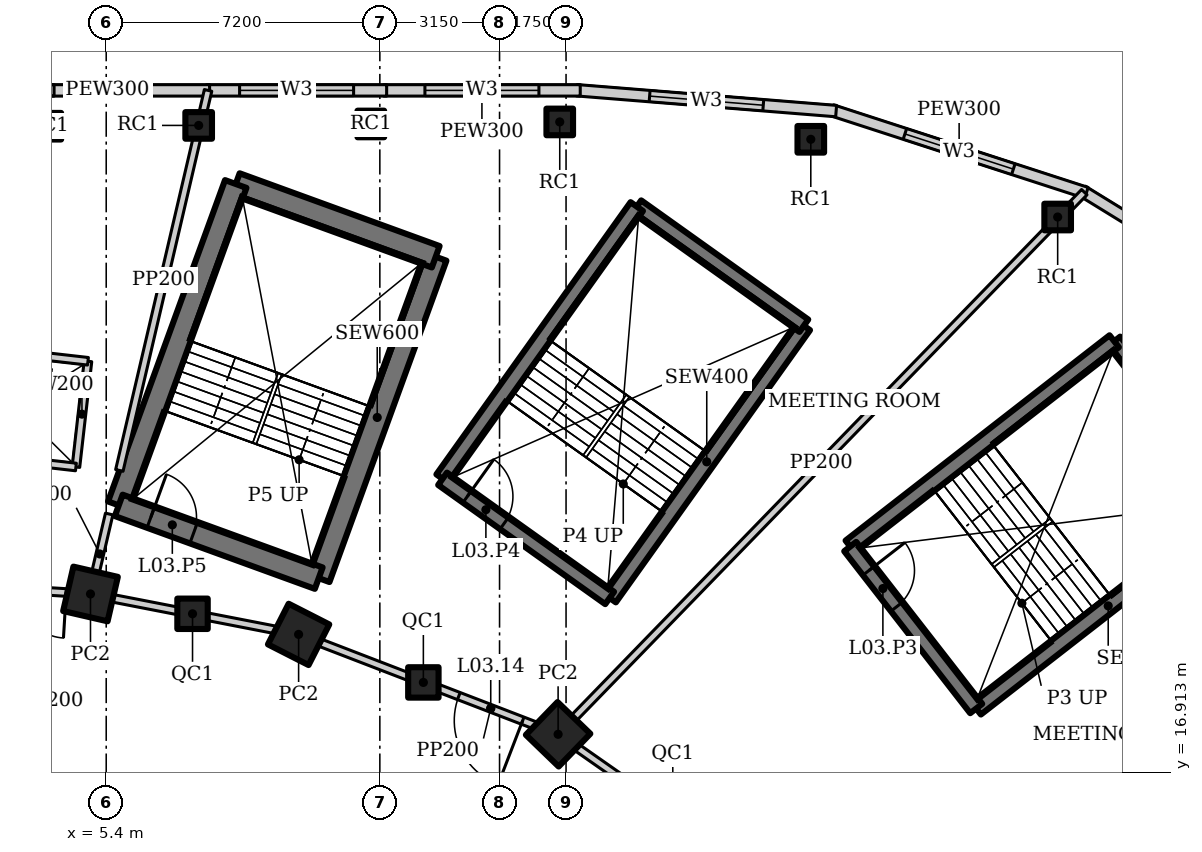
"""IFC4 building model, lengths in metres.
Left out: names, types, materials, properties, quantities, classifications, styles, units other than length and angle.
Written with IfcOpenShell. Run it as: python <this file> out.ifc"""

import sys

from ifc_helpers import new_model, si_unit, direction, frame, frame_2d, origin, origin_2d, place, context, subcontext, project, spatial, rectangle, hollow_rectangle, extrude, element, fill, save


model = new_model("IFC4")
c1 = context("Model", 3, precision=1e-05, world=origin(), true_north=direction((0.0, 1.0)))
c2 = subcontext(c1, "Body", "Model", "MODEL_VIEW")
j1 = project(units=[si_unit("LENGTHUNIT", "METRE"), si_unit("PLANEANGLEUNIT", "RADIAN")], contexts=[c1])
p1 = place(None, origin())
s1 = spatial("IfcSite", under=j1, at=p1, CompositionType="ELEMENT")
p2 = place(p1, origin())
s2 = spatial("IfcBuilding", under=s1, at=p2, CompositionType="ELEMENT")
p3 = place(p2, frame((0.0, 0.0, 22.0)))
s3 = spatial("IfcBuildingStorey", under=s2, at=p3, CompositionType="ELEMENT", Elevation=22.0)
for number, where, z_axis, x_axis in (
    (1, (17.291, 17.905, 0.0), (0.0, 0.0, 1.0), (0.695, 0.719, 0.0)),
    (2, (10.463, 20.534, 0.0), (0.0, 0.0, 1.0), (0.454, 0.891, 0.0)),
    (3, (4.986, 21.598, 0.0), (0.0, 0.0, 1.0), (0.225, 0.974, 0.0)),
):
    element("IfcColumn", number, at=place(p3, frame(where, z_axis=z_axis, x_axis=x_axis)), inside=s3, PredefinedType="COLUMN", context=c2, shape_type="SweptSolid", body=[
        extrude(hollow_rectangle(XDim=1.2, YDim=1.2, WallThickness=0.1, at=origin_2d()), origin(), (0.0, 0.0, 1.0), 5.0),
    ])
for number, where, z_axis, x_axis in (
    (4, (13.745, 19.27, 0.0), (0.0, 0.0, 1.0), (1.0, 0.0, 0.0)),
    (5, (7.671, 21.076, 0.0), (0.0, 0.0, 1.0), (1.0, 0.0, 0.0)),
):
    element("IfcColumn", number, at=place(p3, frame(where, z_axis=z_axis, x_axis=x_axis)), inside=s3, PredefinedType="COLUMN", context=c2, shape_type="SweptSolid", body=[
        extrude(hollow_rectangle(XDim=0.8, YDim=0.8, WallThickness=0.05, at=origin_2d()), origin(), (0.0, 0.0, 1.0), 5.0),
    ])
for number, where, z_axis, x_axis in (
    (6, (23.94, 33.563, 0.0), (0.0, 0.0, 1.0), (1.0, 0.0, 0.0)),
    (7, (12.363, 33.966, 0.0), (0.0, 0.0, 1.0), (1.0, 0.0, 0.0)),
    (8, (3.863, 33.907, 0.0), (0.0, 0.0, 1.0), (1.0, 0.0, 0.0)),
    (9, (30.436, 31.518, 0.0), (0.0, 0.0, 1.0), (1.0, 0.0, 0.0)),
    (10, (17.334, 34.02, 0.0), (0.0, 0.0, 1.0), (1.0, 0.0, 0.0)),
    (11, (7.833, 33.928, 0.0), (0.0, 0.0, 1.0), (1.0, 0.0, 0.0)),
):
    element("IfcColumn", number, at=place(p3, frame(where, z_axis=z_axis, x_axis=x_axis)), inside=s3, PredefinedType="COLUMN", context=c2, shape_type="SweptSolid", body=[
        extrude(hollow_rectangle(XDim=0.7, YDim=0.7, WallThickness=0.04, at=origin_2d()), origin(), (0.0, 0.0, 1.0), 5.0),
    ])
p4 = place(p3, frame((36.932, 28.608, 0.0), z_axis=(0.0, 0.0, 1.0), x_axis=(-0.851808565246, 0.52385319334, 0.0)))
e12 = element("IfcWall", 12, at=p4, inside=s3, PredefinedType="SOLIDWALL", context=c2, shape_type="SweptSolid", body=[
    extrude(rectangle(XDim=6.861, YDim=0.3, at=frame_2d((3.43, 0.0))), origin(), (0.0, 0.0, 1.0), 4.8),
])
p5 = place(p4, frame((1.93, 0.0, 0.9)))
e13 = element("IfcOpeningElement", 13, at=p5, cuts=e12, PredefinedType="OPENING", context=c2, shape_type="SweptSolid", body=[
    extrude(rectangle(XDim=3.0, YDim=2.0, at=frame_2d((1.5, 1.0))), frame((0.0, 0.16, 0.0), z_axis=(0.0, -1.0, 0.0), x_axis=(1.0, 0.0, 0.0)), (0.0, 0.0, 1.0), 0.32),
])
p6 = place(p3, frame((31.192, 32.154, 0.0), z_axis=(0.0, 0.0, 1.0), x_axis=(-0.951140010357, 0.308759907853, 0.0)))
e14 = element("IfcWall", 14, at=p6, inside=s3, PredefinedType="SOLIDWALL", context=c2, shape_type="SweptSolid", body=[
    extrude(rectangle(XDim=7.041, YDim=0.3, at=frame_2d((3.521, 0.0))), origin(), (0.0, 0.0, 1.0), 4.8),
])
p7 = place(p6, frame((2.021, 0.0, 0.9)))
e15 = element("IfcOpeningElement", 15, at=p7, cuts=e14, PredefinedType="OPENING", context=c2, shape_type="SweptSolid", body=[
    extrude(rectangle(XDim=3.0, YDim=2.0, at=frame_2d((1.5, 1.0))), frame((0.0, 0.16, 0.0), z_axis=(0.0, -1.0, 0.0), x_axis=(1.0, 0.0, 0.0)), (0.0, 0.0, 1.0), 0.32),
])
p8 = place(p3, frame((24.607, 34.306, 0.0), z_axis=(0.0, 0.0, 1.0), x_axis=(-0.996791084449, 0.080047073422, 0.0)))
e16 = element("IfcWall", 16, at=p8, inside=s3, PredefinedType="SOLIDWALL", context=c2, shape_type="SweptSolid", body=[
    extrude(rectangle(XDim=6.847, YDim=0.3, at=frame_2d((3.424, 0.0))), origin(), (0.0, 0.0, 1.0), 4.8),
])
p9 = place(p8, frame((1.924, 0.0, 0.9)))
e17 = element("IfcOpeningElement", 17, at=p9, cuts=e16, PredefinedType="OPENING", context=c2, shape_type="SweptSolid", body=[
    extrude(rectangle(XDim=3.0, YDim=2.0, at=frame_2d((1.5, 1.0))), frame((0.0, 0.16, 0.0), z_axis=(0.0, -1.0, 0.0), x_axis=(1.0, 0.0, 0.0)), (0.0, 0.0, 1.0), 0.32),
])
p10 = place(p3, frame((17.873, 34.85, 0.0), z_axis=(0.0, 0.0, 1.0), x_axis=(-1.0, 0.0, 0.0)))
e18 = element("IfcWall", 18, at=p10, inside=s3, PredefinedType="SOLIDWALL", context=c2, shape_type="SweptSolid", body=[
    extrude(rectangle(XDim=5.174, YDim=0.3, at=frame_2d((2.587, 0.0))), origin(), (0.0, 0.0, 1.0), 4.8),
])
p11 = place(p10, frame((1.087, 0.0, 0.9)))
e19 = element("IfcOpeningElement", 19, at=p11, cuts=e18, PredefinedType="OPENING", context=c2, shape_type="SweptSolid", body=[
    extrude(rectangle(XDim=3.0, YDim=2.0, at=frame_2d((1.5, 1.0))), frame((0.0, 0.16, 0.0), z_axis=(0.0, -1.0, 0.0), x_axis=(1.0, 0.0, 0.0)), (0.0, 0.0, 1.0), 0.32),
])
p12 = place(p3, frame((12.779, 34.85, 0.0), z_axis=(0.0, 0.0, 1.0), x_axis=(-1.0, 0.0, 0.0)))
e20 = element("IfcWall", 20, at=p12, inside=s3, PredefinedType="SOLIDWALL", context=c2, shape_type="SweptSolid", body=[
    extrude(rectangle(XDim=4.739, YDim=0.3, at=frame_2d((2.369, 0.0))), origin(), (0.0, 0.0, 1.0), 4.8),
])
p13 = place(p12, frame((0.869, 0.0, 0.9)))
e21 = element("IfcOpeningElement", 21, at=p13, cuts=e20, PredefinedType="OPENING", context=c2, shape_type="SweptSolid", body=[
    extrude(rectangle(XDim=3.0, YDim=2.0, at=frame_2d((1.5, 1.0))), frame((0.0, 0.16, 0.0), z_axis=(0.0, -1.0, 0.0), x_axis=(1.0, 0.0, 0.0)), (0.0, 0.0, 1.0), 0.32),
])
p14 = place(p3, frame((8.12, 34.85, 0.0), z_axis=(0.0, 0.0, 1.0), x_axis=(-1.0, 0.0, 0.0)))
e22 = element("IfcWall", 22, at=p14, inside=s3, PredefinedType="SOLIDWALL", context=c2, shape_type="SweptSolid", body=[
    extrude(rectangle(XDim=4.173, YDim=0.3, at=frame_2d((2.086, 0.0))), origin(), (0.0, 0.0, 1.0), 4.8),
])
p15 = place(p3, frame((4.028, 34.85, 0.0), z_axis=(0.0, 0.0, 1.0), x_axis=(-1.0, 0.0, 0.0)))
e23 = element("IfcWall", 23, at=p15, inside=s3, PredefinedType="SOLIDWALL", context=c2, shape_type="SweptSolid", body=[
    extrude(rectangle(XDim=4.068, YDim=0.3, at=frame_2d((2.034, 0.0))), origin(), (0.0, 0.0, 1.0), 4.8),
])
p16 = place(p3, frame((20.309, 15.794, 0.0), z_axis=(0.0, 0.0, 1.0), x_axis=(-0.819409395821, 0.573208724672, 0.0)))
e24 = element("IfcWall", 24, at=p16, inside=s3, PredefinedType="SOLIDWALL", context=c2, shape_type="SweptSolid", body=[
    extrude(rectangle(XDim=3.683, YDim=0.2, at=frame_2d((1.841, 0.0))), origin(), (0.0, 0.0, 1.0), 4.396),
])
p17 = place(p3, frame((17.291, 17.905, 0.0), z_axis=(0.0, 0.0, 1.0), x_axis=(-0.933224646415, 0.359293416754, 0.0)))
e25 = element("IfcWall", 25, at=p17, inside=s3, PredefinedType="SOLIDWALL", context=c2, shape_type="SweptSolid", body=[
    extrude(rectangle(XDim=3.799, YDim=0.2, at=frame_2d((1.899, 0.0))), origin(), (0.0, 0.0, 1.0), 4.355),
])
p18 = place(p17, frame((1.0, 0.0, 0.0)))
e26 = element("IfcOpeningElement", 26, at=p18, cuts=e25, PredefinedType="OPENING", context=c2, shape_type="SweptSolid", body=[
    extrude(rectangle(XDim=1.8, YDim=2.4, at=frame_2d((0.9, 1.2))), frame((0.0, 0.11, 0.0), z_axis=(0.0, -1.0, 0.0), x_axis=(1.0, 0.0, 0.0)), (0.0, 0.0, 1.0), 0.22),
])
p19 = place(p3, frame((13.745, 19.27, 0.0), z_axis=(0.0, 0.0, 1.0), x_axis=(-0.933241815012, 0.359248820058, 0.0)))
e27 = element("IfcWall", 27, at=p19, inside=s3, PredefinedType="SOLIDWALL", context=c2, shape_type="SweptSolid", body=[
    extrude(rectangle(XDim=3.518, YDim=0.2, at=frame_2d((1.759, 0.0))), origin(), (0.0, 0.0, 1.0), 4.396),
])
p20 = place(p3, frame((10.463, 20.534, 0.0), z_axis=(0.0, 0.0, 1.0), x_axis=(-0.98163593748, 0.190763954266, 0.0)))
e28 = element("IfcWall", 28, at=p20, inside=s3, PredefinedType="SOLIDWALL", context=c2, shape_type="SweptSolid", body=[
    extrude(rectangle(XDim=2.844, YDim=0.2, at=frame_2d((1.422, 0.0))), origin(), (0.0, 0.0, 1.0), 4.338),
])
p21 = place(p3, frame((7.671, 21.076, 0.0), z_axis=(0.0, 0.0, 1.0), x_axis=(-0.981637218105, 0.190757364289, 0.0)))
e29 = element("IfcWall", 29, at=p21, inside=s3, PredefinedType="SOLIDWALL", context=c2, shape_type="SweptSolid", body=[
    extrude(rectangle(XDim=2.735, YDim=0.2, at=frame_2d((1.368, 0.0))), origin(), (0.0, 0.0, 1.0), 4.338),
])
p22 = place(p3, frame((4.986, 21.598, 0.0), z_axis=(0.0, 0.0, 1.0), x_axis=(-0.998172405641, 0.060430527186, 0.0)))
e30 = element("IfcWall", 30, at=p22, inside=s3, PredefinedType="SOLIDWALL", context=c2, shape_type="SweptSolid", body=[
    extrude(rectangle(XDim=2.513, YDim=0.2, at=frame_2d((1.256, 0.0))), origin(), (0.0, 0.0, 1.0), 4.396),
])
p23 = place(p22, frame((0.64, 0.0, 0.0)))
e31 = element("IfcOpeningElement", 31, at=p23, cuts=e30, PredefinedType="OPENING", context=c2, shape_type="SweptSolid", body=[
    extrude(rectangle(XDim=1.2, YDim=2.4, at=frame_2d((0.6, 1.2))), frame((0.0, 0.11, 0.0), z_axis=(0.0, -1.0, 0.0), x_axis=(1.0, 0.0, 0.0)), (0.0, 0.0, 1.0), 0.22),
])
p24 = place(p3, frame((17.291, 17.905, 0.0), z_axis=(0.0, 0.0, 1.0), x_axis=(0.696460684513, 0.717594951855, 0.0)))
e32 = element("IfcWall", 32, at=p24, inside=s3, PredefinedType="SOLIDWALL", context=c2, shape_type="SweptSolid", body=[
    extrude(rectangle(XDim=19.881, YDim=0.2, at=frame_2d((9.94, 0.0))), origin(), (0.0, 0.0, 1.0), 3.3),
])
p25 = place(p3, frame((4.986, 21.598, 0.0), z_axis=(0.0, 0.0, 1.0), x_axis=(0.227351065365, 0.973812863479, 0.0)))
e33 = element("IfcWall", 33, at=p25, inside=s3, PredefinedType="SOLIDWALL", context=c2, shape_type="SweptSolid", body=[
    extrude(rectangle(XDim=2.161, YDim=0.2, at=frame_2d((1.08, 0.0))), origin(), (0.0, 0.0, 1.0), 3.3),
])
p26 = place(p3, frame((5.745, 24.849, 0.0), z_axis=(0.0, 0.0, 1.0), x_axis=(0.227353607936, 0.973812269875, 0.0)))
e34 = element("IfcWall", 34, at=p26, inside=s3, PredefinedType="SOLIDWALL", context=c2, shape_type="SweptSolid", body=[
    extrude(rectangle(XDim=10.27, YDim=0.2, at=frame_2d((5.135, 0.0))), origin(), (0.0, 0.0, 1.0), 3.3),
])
p27 = place(p3, frame((28.293, 18.583, 0.0), z_axis=(0.0, 0.0, 1.0), x_axis=(0.78938060008, 0.613904119726, 0.0)))
e35 = element("IfcWall", 35, at=p27, inside=s3, PredefinedType="SHEAR", context=c2, shape_type="SweptSolid", body=[
    extrude(rectangle(XDim=8.8, YDim=0.4, at=frame_2d((4.4, 0.0))), origin(), (0.0, 0.0, 1.0), 5.0),
])
p28 = place(p3, frame((35.239, 23.985, 0.0), z_axis=(0.0, 0.0, 1.0), x_axis=(-0.613912443548, 0.789374126544, 0.0)))
e36 = element("IfcWall", 36, at=p28, inside=s3, PredefinedType="SHEAR", context=c2, shape_type="SweptSolid", body=[
    extrude(rectangle(XDim=5.4, YDim=0.4, at=frame_2d((2.7, 0.0))), origin(), (0.0, 0.0, 1.0), 5.0),
])
p29 = place(p3, frame((31.924, 28.248, 0.0), z_axis=(0.0, 0.0, 1.0), x_axis=(-0.78938060008, -0.613904119726, 0.0)))
e37 = element("IfcWall", 37, at=p29, inside=s3, PredefinedType="SHEAR", context=c2, shape_type="SweptSolid", body=[
    extrude(rectangle(XDim=8.8, YDim=0.4, at=frame_2d((4.4, 0.0))), origin(), (0.0, 0.0, 1.0), 5.0),
])
p30 = place(p3, frame((24.978, 22.846, 0.0), z_axis=(0.0, 0.0, 1.0), x_axis=(0.613912443548, -0.789374126544, 0.0)))
e38 = element("IfcWall", 38, at=p30, inside=s3, PredefinedType="SHEAR", context=c2, shape_type="SweptSolid", body=[
    extrude(rectangle(XDim=5.4, YDim=0.4, at=frame_2d((2.7, 0.0))), origin(), (0.0, 0.0, 1.0), 5.0),
])
p31 = place(p30, frame((0.8, 0.0, 0.0)))
e39 = element("IfcOpeningElement", 39, at=p31, cuts=e38, PredefinedType="OPENING", context=c2, shape_type="SweptSolid", body=[
    extrude(rectangle(XDim=1.2, YDim=2.1, at=frame_2d((0.6, 1.05))), frame((0.0, 0.21, 0.0), z_axis=(0.0, -1.0, 0.0), x_axis=(1.0, 0.0, 0.0)), (0.0, 0.0, 1.0), 0.42),
])
p32 = place(p3, frame((18.647, 21.493, 0.0), z_axis=(0.0, 0.0, 1.0), x_axis=(0.580705313356, 0.814113836659, 0.0)))
e40 = element("IfcWall", 40, at=p32, inside=s3, PredefinedType="SHEAR", context=c2, shape_type="SweptSolid", body=[
    extrude(rectangle(XDim=8.8, YDim=0.4, at=frame_2d((4.4, 0.0))), origin(), (0.0, 0.0, 1.0), 5.0),
])
p33 = place(p3, frame((23.757, 28.657, 0.0), z_axis=(0.0, 0.0, 1.0), x_axis=(-0.814121252423, 0.580694916762, 0.0)))
e41 = element("IfcWall", 41, at=p33, inside=s3, PredefinedType="SHEAR", context=c2, shape_type="SweptSolid", body=[
    extrude(rectangle(XDim=5.4, YDim=0.4, at=frame_2d((2.7, 0.0))), origin(), (0.0, 0.0, 1.0), 5.0),
])
p34 = place(p3, frame((19.361, 31.793, 0.0), z_axis=(0.0, 0.0, 1.0), x_axis=(-0.580705313356, -0.814113836659, 0.0)))
e42 = element("IfcWall", 42, at=p34, inside=s3, PredefinedType="SHEAR", context=c2, shape_type="SweptSolid", body=[
    extrude(rectangle(XDim=8.8, YDim=0.4, at=frame_2d((4.4, 0.0))), origin(), (0.0, 0.0, 1.0), 5.0),
])
p35 = place(p3, frame((14.251, 24.629, 0.0), z_axis=(0.0, 0.0, 1.0), x_axis=(0.814121252423, -0.580694916762, 0.0)))
e43 = element("IfcWall", 43, at=p35, inside=s3, PredefinedType="SHEAR", context=c2, shape_type="SweptSolid", body=[
    extrude(rectangle(XDim=5.4, YDim=0.4, at=frame_2d((2.7, 0.0))), origin(), (0.0, 0.0, 1.0), 5.0),
])
p36 = place(p35, frame((0.8, 0.0, 0.0)))
e44 = element("IfcOpeningElement", 44, at=p36, cuts=e43, PredefinedType="OPENING", context=c2, shape_type="SweptSolid", body=[
    extrude(rectangle(XDim=1.2, YDim=2.1, at=frame_2d((0.6, 1.05))), frame((0.0, 0.21, 0.0), z_axis=(0.0, -1.0, 0.0), x_axis=(1.0, 0.0, 0.0)), (0.0, 0.0, 1.0), 0.42),
])
p37 = place(p3, frame((10.992, 22.014, 0.0), z_axis=(0.0, 0.0, 1.0), x_axis=(0.342013127703, 0.939695174234, 0.0)))
e45 = element("IfcWall", 45, at=p37, inside=s3, PredefinedType="SHEAR", context=c2, shape_type="SweptSolid", body=[
    extrude(rectangle(XDim=9.0, YDim=0.6, at=frame_2d((4.5, 0.0))), origin(), (0.0, 0.0, 1.0), 5.0),
])
p38 = place(p3, frame((14.07, 30.471, 0.0), z_axis=(0.0, 0.0, 1.0), x_axis=(-0.939692822968, 0.342019587834, 0.0)))
e46 = element("IfcWall", 46, at=p38, inside=s3, PredefinedType="SHEAR", context=c2, shape_type="SweptSolid", body=[
    extrude(rectangle(XDim=5.6, YDim=0.6, at=frame_2d((2.8, 0.0))), origin(), (0.0, 0.0, 1.0), 5.0),
])
p39 = place(p3, frame((8.808, 32.387, 0.0), z_axis=(0.0, 0.0, 1.0), x_axis=(-0.3420218461, -0.939692001025, 0.0)))
e47 = element("IfcWall", 47, at=p39, inside=s3, PredefinedType="SHEAR", context=c2, shape_type="SweptSolid", body=[
    extrude(rectangle(XDim=9.0, YDim=0.6, at=frame_2d((4.5, 0.0))), origin(), (0.0, 0.0, 1.0), 5.0),
])
p40 = place(p3, frame((5.73, 23.93, 0.0), z_axis=(0.0, 0.0, 1.0), x_axis=(0.939678810556, -0.342058084236, 0.0)))
e48 = element("IfcWall", 48, at=p40, inside=s3, PredefinedType="SHEAR", context=c2, shape_type="SweptSolid", body=[
    extrude(rectangle(XDim=5.6, YDim=0.6, at=frame_2d((2.8, 0.0))), origin(), (0.0, 0.0, 1.0), 5.0),
])
p41 = place(p40, frame((0.9, 0.0, 0.0)))
e49 = element("IfcOpeningElement", 49, at=p41, cuts=e48, PredefinedType="OPENING", context=c2, shape_type="SweptSolid", body=[
    extrude(rectangle(XDim=1.2, YDim=2.1, at=frame_2d((0.6, 1.05))), frame((0.0, 0.31, 0.0), z_axis=(0.0, -1.0, 0.0), x_axis=(1.0, 0.0, 0.0)), (0.0, 0.0, 1.0), 0.62),
])
p42 = place(p3, frame((4.603, 24.939, 0.0), z_axis=(0.0, 0.0, 1.0), x_axis=(0.113177712989, 0.993574760792, 0.0)))
e50 = element("IfcWall", 50, at=p42, inside=s3, PredefinedType="SOLIDWALL", context=c2, shape_type="SweptSolid", body=[
    extrude(rectangle(XDim=2.8, YDim=0.2, at=frame_2d((1.4, 0.0))), origin(), (0.0, 0.0, 1.0), 4.8),
])
p43 = place(p3, frame((4.92, 27.721, 0.0), z_axis=(0.0, 0.0, 1.0), x_axis=(-0.993571061716, 0.113210182053, 0.0)))
e51 = element("IfcWall", 51, at=p43, inside=s3, PredefinedType="SOLIDWALL", context=c2, shape_type="SweptSolid", body=[
    extrude(rectangle(XDim=3.5, YDim=0.2, at=frame_2d((1.75, 0.0))), origin(), (0.0, 0.0, 1.0), 3.3),
])
p44 = place(p3, frame((1.125, 25.335, 0.0), z_axis=(0.0, 0.0, 1.0), x_axis=(0.993571061716, -0.113210182053, 0.0)))
e52 = element("IfcWall", 52, at=p44, inside=s3, PredefinedType="SOLIDWALL", context=c2, shape_type="SweptSolid", body=[
    extrude(rectangle(XDim=3.5, YDim=0.2, at=frame_2d((1.75, 0.0))), origin(), (0.0, 0.0, 1.0), 3.3),
])
p45 = place(p44, frame((1.2, 0.0, 0.0)))
e53 = element("IfcOpeningElement", 53, at=p45, cuts=e52, PredefinedType="OPENING", context=c2, shape_type="SweptSolid", body=[
    extrude(rectangle(XDim=1.1, YDim=2.2, at=frame_2d((0.55, 1.1))), frame((0.0, 0.11, 0.0), z_axis=(0.0, -1.0, 0.0), x_axis=(1.0, 0.0, 0.0)), (0.0, 0.0, 1.0), 0.22),
])
p46 = place(p7, origin())
e54 = element("IfcWindow", 54, at=p46, inside=s3, PartitioningType="SINGLE_PANEL", PredefinedType="WINDOW", context=c2, shape_type="SweptSolid", body=[
    extrude(rectangle(XDim=3.0, YDim=2.0, at=frame_2d((1.5, 1.0))), frame((0.0, 0.03, 0.0), z_axis=(0.0, -1.0, 0.0), x_axis=(1.0, 0.0, 0.0)), (0.0, 0.0, 1.0), 0.06),
])
fill(e15, e54)
p47 = place(p9, origin())
e55 = element("IfcWindow", 55, at=p47, inside=s3, PartitioningType="SINGLE_PANEL", PredefinedType="WINDOW", context=c2, shape_type="SweptSolid", body=[
    extrude(rectangle(XDim=3.0, YDim=2.0, at=frame_2d((1.5, 1.0))), frame((0.0, 0.03, 0.0), z_axis=(0.0, -1.0, 0.0), x_axis=(1.0, 0.0, 0.0)), (0.0, 0.0, 1.0), 0.06),
])
fill(e17, e55)
p48 = place(p11, origin())
e56 = element("IfcWindow", 56, at=p48, inside=s3, PartitioningType="SINGLE_PANEL", PredefinedType="WINDOW", context=c2, shape_type="SweptSolid", body=[
    extrude(rectangle(XDim=3.0, YDim=2.0, at=frame_2d((1.5, 1.0))), frame((0.0, 0.03, 0.0), z_axis=(0.0, -1.0, 0.0), x_axis=(1.0, 0.0, 0.0)), (0.0, 0.0, 1.0), 0.06),
])
fill(e19, e56)
p49 = place(p13, origin())
e57 = element("IfcWindow", 57, at=p49, inside=s3, PartitioningType="SINGLE_PANEL", PredefinedType="WINDOW", context=c2, shape_type="SweptSolid", body=[
    extrude(rectangle(XDim=3.0, YDim=2.0, at=frame_2d((1.5, 1.0))), frame((0.0, 0.03, 0.0), z_axis=(0.0, -1.0, 0.0), x_axis=(1.0, 0.0, 0.0)), (0.0, 0.0, 1.0), 0.06),
])
fill(e21, e57)
p50 = place(p18, origin())
e58 = element("IfcDoor", 58, at=p50, inside=s3, OperationType="DOUBLE_DOOR_DOUBLE_SWING", PredefinedType="DOOR", context=c2, shape_type="SweptSolid", body=[
    extrude(rectangle(XDim=1.8, YDim=2.4, at=frame_2d((0.9, 1.2))), frame((0.0, 0.025, 0.0), z_axis=(0.0, -1.0, 0.0), x_axis=(1.0, 0.0, 0.0)), (0.0, 0.0, 1.0), 0.05),
])
fill(e26, e58)
p51 = place(p23, origin())
e59 = element("IfcDoor", 59, at=p51, inside=s3, OperationType="SINGLE_SWING_RIGHT", PredefinedType="DOOR", context=c2, shape_type="SweptSolid", body=[
    extrude(rectangle(XDim=1.2, YDim=2.4, at=frame_2d((0.6, 1.2))), frame((0.0, 0.025, 0.0), z_axis=(0.0, -1.0, 0.0), x_axis=(1.0, 0.0, 0.0)), (0.0, 0.0, 1.0), 0.05),
])
fill(e31, e59)
p52 = place(p31, origin())
e60 = element("IfcDoor", 60, at=p52, inside=s3, OperationType="SINGLE_SWING_RIGHT", PredefinedType="DOOR", context=c2, shape_type="SweptSolid", body=[
    extrude(rectangle(XDim=1.2, YDim=2.1, at=frame_2d((0.6, 1.05))), frame((0.0, 0.025, 0.0), z_axis=(0.0, -1.0, 0.0), x_axis=(1.0, 0.0, 0.0)), (0.0, 0.0, 1.0), 0.05),
])
fill(e39, e60)
p53 = place(p36, origin())
e61 = element("IfcDoor", 61, at=p53, inside=s3, OperationType="SINGLE_SWING_RIGHT", PredefinedType="DOOR", context=c2, shape_type="SweptSolid", body=[
    extrude(rectangle(XDim=1.2, YDim=2.1, at=frame_2d((0.6, 1.05))), frame((0.0, 0.025, 0.0), z_axis=(0.0, -1.0, 0.0), x_axis=(1.0, 0.0, 0.0)), (0.0, 0.0, 1.0), 0.05),
])
fill(e44, e61)
p54 = place(p41, origin())
e62 = element("IfcDoor", 62, at=p54, inside=s3, OperationType="SINGLE_SWING_RIGHT", PredefinedType="DOOR", context=c2, shape_type="SweptSolid", body=[
    extrude(rectangle(XDim=1.2, YDim=2.1, at=frame_2d((0.6, 1.05))), frame((0.0, 0.025, 0.0), z_axis=(0.0, -1.0, 0.0), x_axis=(1.0, 0.0, 0.0)), (0.0, 0.0, 1.0), 0.05),
])
fill(e49, e62)
save(model, sys.argv[1])
